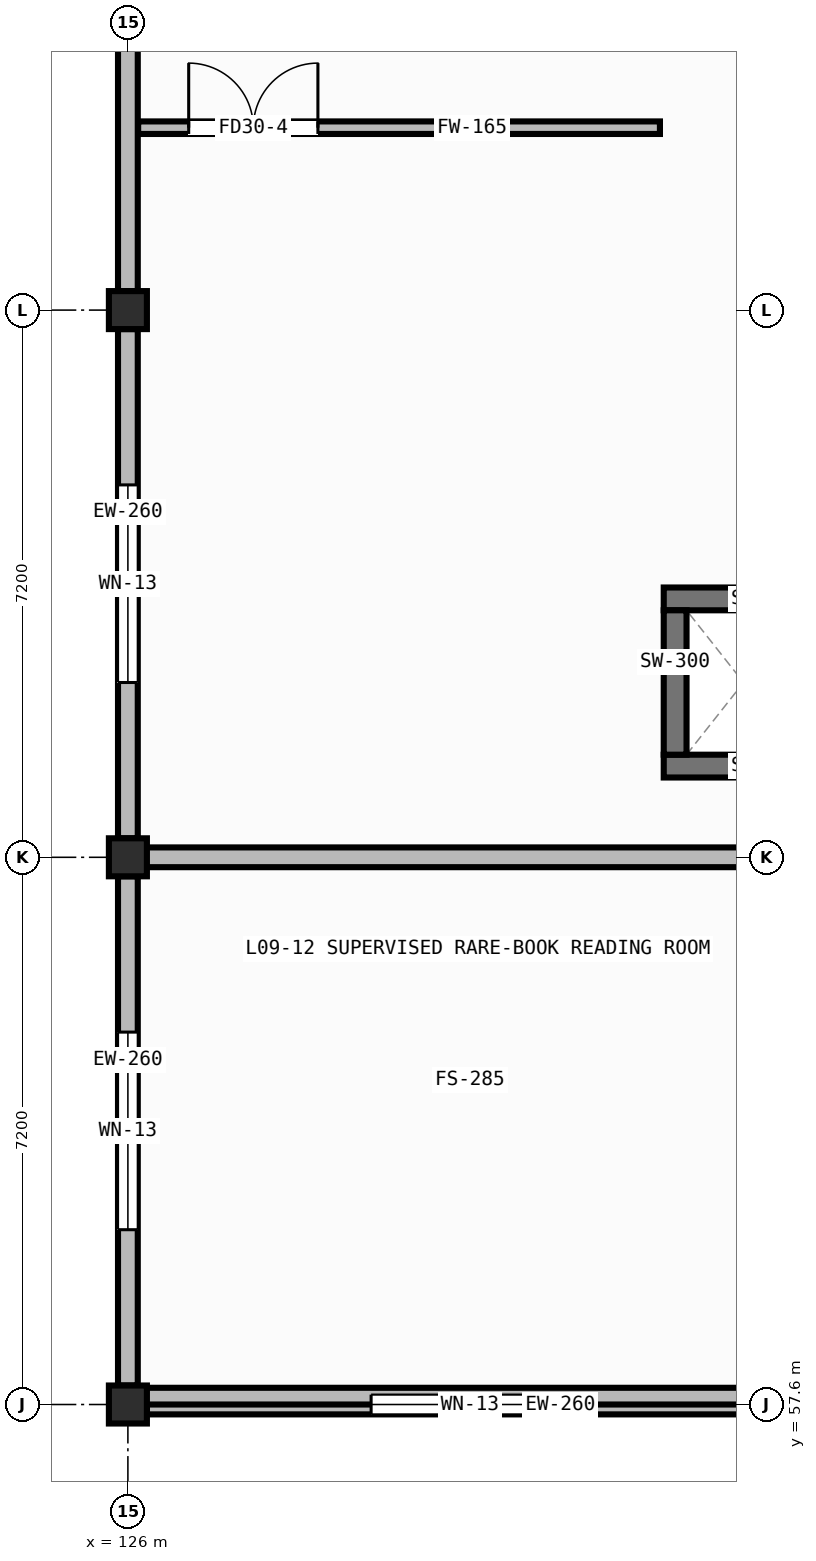
"""IFC4 building model, lengths in metres.
Left out: names, types, materials, properties, quantities, classifications, styles, units other than length and angle.
Written with IfcOpenShell. Run it as: python <this file> out.ifc"""

import sys

from ifc_helpers import new_model, si_unit, direction, frame, frame_2d, origin, origin_2d, place, context, subcontext, project, spatial, rectangle, hollow_rectangle, extrude, element, fill, save


model = new_model("IFC4")
c1 = context("Model", 3, precision=1e-05, world=origin(), true_north=direction((0.0, 1.0)))
c2 = subcontext(c1, "Body", "Model", "MODEL_VIEW")
j1 = project(units=[si_unit("LENGTHUNIT", "METRE"), si_unit("PLANEANGLEUNIT", "RADIAN")], contexts=[c1])
p1 = place(None, origin())
s1 = spatial("IfcSite", under=j1, at=p1, CompositionType="ELEMENT")
p2 = place(p1, origin())
s2 = spatial("IfcBuilding", under=s1, at=p2, CompositionType="ELEMENT")
p3 = place(p2, frame((0.0, 0.0, 31.4)))
s3 = spatial("IfcBuildingStorey", under=s2, at=p3, CompositionType="ELEMENT", Elevation=31.4)
for number, where, z_axis, x_axis in (
    (1, (126.0, 57.6, 0.0), (0.0, 0.0, 1.0), (1.0, 0.0, 0.0)),
    (2, (126.0, 64.8, 0.0), (0.0, 0.0, 1.0), (1.0, 0.0, 0.0)),
    (3, (126.0, 72.0, 0.0), (0.0, 0.0, 1.0), (1.0, 0.0, 0.0)),
):
    element("IfcColumn", number, at=place(p3, frame(where, z_axis=z_axis, x_axis=x_axis)), inside=s3, PredefinedType="COLUMN", context=c2, shape_type="SweptSolid", body=[
        extrude(hollow_rectangle(XDim=0.5, YDim=0.5, WallThickness=0.022, at=origin_2d()), origin(), (0.0, 0.0, 1.0), 3.56),
    ])
p4 = place(p3, frame((126.25, 57.6, 0.0), z_axis=(0.0, 0.0, 1.0), x_axis=(1.0, 0.0, 0.0)))
e4 = element("IfcWall", 4, at=p4, inside=s3, PredefinedType="STANDARD", context=c2, shape_type="SweptSolid", body=[
    extrude(rectangle(XDim=8.5, YDim=0.26, at=frame_2d((4.25, 0.0))), origin(), (0.0, 0.0, 1.0), 3.16),
])
p5 = place(p4, frame((2.95, 0.0, 0.85)))
e5 = element("IfcOpeningElement", 5, at=p5, cuts=e4, PredefinedType="OPENING", context=c2, shape_type="SweptSolid", body=[
    extrude(rectangle(XDim=2.6, YDim=1.6, at=frame_2d((1.3, 0.8))), frame((0.0, 0.142, 0.0), z_axis=(0.0, -1.0, 0.0), x_axis=(1.0, 0.0, 0.0)), (0.0, 0.0, 1.0), 0.284),
])
p6 = place(p3, frame((126.0, 57.85, 0.0), z_axis=(0.0, 0.0, 1.0), x_axis=(0.0, 1.0, 0.0)))
e6 = element("IfcWall", 6, at=p6, inside=s3, PredefinedType="STANDARD", context=c2, shape_type="SweptSolid", body=[
    extrude(rectangle(XDim=6.7, YDim=0.26, at=frame_2d((3.35, 0.0))), origin(), (0.0, 0.0, 1.0), 3.16),
])
p7 = place(p6, frame((2.05, 0.0, 0.85)))
e7 = element("IfcOpeningElement", 7, at=p7, cuts=e6, PredefinedType="OPENING", context=c2, shape_type="SweptSolid", body=[
    extrude(rectangle(XDim=2.6, YDim=1.6, at=frame_2d((1.3, 0.8))), frame((0.0, 0.142, 0.0), z_axis=(0.0, -1.0, 0.0), x_axis=(1.0, 0.0, 0.0)), (0.0, 0.0, 1.0), 0.284),
])
p8 = place(p3, frame((126.0, 65.05, 0.0), z_axis=(0.0, 0.0, 1.0), x_axis=(0.0, 1.0, 0.0)))
e8 = element("IfcWall", 8, at=p8, inside=s3, PredefinedType="STANDARD", context=c2, shape_type="SweptSolid", body=[
    extrude(rectangle(XDim=6.7, YDim=0.26, at=frame_2d((3.35, 0.0))), origin(), (0.0, 0.0, 1.0), 3.16),
])
p9 = place(p8, frame((2.05, 0.0, 0.85)))
e9 = element("IfcOpeningElement", 9, at=p9, cuts=e8, PredefinedType="OPENING", context=c2, shape_type="SweptSolid", body=[
    extrude(rectangle(XDim=2.6, YDim=1.6, at=frame_2d((1.3, 0.8))), frame((0.0, 0.142, 0.0), z_axis=(0.0, -1.0, 0.0), x_axis=(1.0, 0.0, 0.0)), (0.0, 0.0, 1.0), 0.284),
])
p10 = place(p3, frame((126.0, 72.25, 0.0), z_axis=(0.0, 0.0, 1.0), x_axis=(0.0, 1.0, 0.0)))
e10 = element("IfcWall", 10, at=p10, inside=s3, PredefinedType="STANDARD", context=c2, shape_type="SweptSolid", body=[
    extrude(rectangle(XDim=6.7, YDim=0.26, at=frame_2d((3.35, 0.0))), origin(), (0.0, 0.0, 1.0), 3.16),
])
p11 = place(p3, frame((126.2, 64.8, 3.8), z_axis=(0.0, 0.0, 1.0), x_axis=(1.0, 0.0, 0.0)))
e11 = element("IfcWall", 11, at=p11, inside=s3, PredefinedType="STANDARD", context=c2, shape_type="SweptSolid", body=[
    extrude(rectangle(XDim=35.6, YDim=0.26, at=frame_2d((17.8, 0.0))), origin(), (0.0, 0.0, 1.0), 1.92),
])
p12 = place(p3, frame((126.0, 57.71, 3.8), z_axis=(0.0, 0.0, 1.0), x_axis=(1.0, 0.0, 0.0)))
e12 = element("IfcWall", 12, at=p12, inside=s3, PredefinedType="PARAPET", context=c2, shape_type="SweptSolid", body=[
    extrude(rectangle(XDim=36.0, YDim=0.22, at=frame_2d((18.0, 0.0))), origin(), (0.0, 0.0, 1.0), 0.9),
])
for number, where, z_axis, x_axis in (
    (13, (133.05, 66.0, 0.0), (0.0, 0.0, 1.0), (1.0, 0.0, 0.0)),
    (14, (133.05, 68.2, 0.0), (0.0, 0.0, 1.0), (1.0, 0.0, 0.0)),
):
    element("IfcWall", number, at=place(p3, frame(where, z_axis=z_axis, x_axis=x_axis)), inside=s3, PredefinedType="SHEAR", context=c2, shape_type="SweptSolid", body=[
        extrude(rectangle(XDim=2.1, YDim=0.3, at=frame_2d((1.05, 0.0))), origin(), (0.0, 0.0, 1.0), 3.56),
    ])
p13 = place(p3, frame((133.2, 66.15, 0.0), z_axis=(0.0, 0.0, 1.0), x_axis=(0.0, 1.0, 0.0)))
e15 = element("IfcWall", 15, at=p13, inside=s3, PredefinedType="SHEAR", context=c2, shape_type="SweptSolid", body=[
    extrude(rectangle(XDim=1.9, YDim=0.3, at=frame_2d((0.95, 0.0))), origin(), (0.0, 0.0, 1.0), 3.56),
])
p14 = place(p3, frame((126.135, 74.4, 0.0), z_axis=(0.0, 0.0, 1.0), x_axis=(1.0, 0.0, 0.0)))
e16 = element("IfcWall", 16, at=p14, inside=s3, PredefinedType="PARTITIONING", context=c2, shape_type="SweptSolid", body=[
    extrude(rectangle(XDim=6.865, YDim=0.165, at=frame_2d((3.433, 0.0))), origin(), (0.0, 0.0, 1.0), 3.56),
])
p15 = place(p14, frame((0.665, 0.0, 0.0)))
e17 = element("IfcOpeningElement", 17, at=p15, cuts=e16, PredefinedType="OPENING", context=c2, shape_type="SweptSolid", body=[
    extrude(rectangle(XDim=1.7, YDim=2.12, at=frame_2d((0.85, 1.06))), frame((0.0, 0.094, 0.0), z_axis=(0.0, -1.0, 0.0), x_axis=(1.0, 0.0, 0.0)), (0.0, 0.0, 1.0), 0.189),
])
p16 = place(p5, origin())
e18 = element("IfcWindow", 18, at=p16, inside=s3, PartitioningType="DOUBLE_PANEL_VERTICAL", PredefinedType="WINDOW", context=c2, shape_type="SweptSolid", body=[
    extrude(rectangle(XDim=2.6, YDim=1.6, at=frame_2d((1.3, 0.8))), frame((0.0, 0.03, 0.0), z_axis=(0.0, -1.0, 0.0), x_axis=(1.0, 0.0, 0.0)), (0.0, 0.0, 1.0), 0.06),
])
fill(e5, e18)
p17 = place(p7, origin())
e19 = element("IfcWindow", 19, at=p17, inside=s3, PartitioningType="DOUBLE_PANEL_VERTICAL", PredefinedType="WINDOW", context=c2, shape_type="SweptSolid", body=[
    extrude(rectangle(XDim=2.6, YDim=1.6, at=frame_2d((1.3, 0.8))), frame((0.0, 0.03, 0.0), z_axis=(0.0, -1.0, 0.0), x_axis=(1.0, 0.0, 0.0)), (0.0, 0.0, 1.0), 0.06),
])
fill(e7, e19)
p18 = place(p9, origin())
e20 = element("IfcWindow", 20, at=p18, inside=s3, PartitioningType="DOUBLE_PANEL_VERTICAL", PredefinedType="WINDOW", context=c2, shape_type="SweptSolid", body=[
    extrude(rectangle(XDim=2.6, YDim=1.6, at=frame_2d((1.3, 0.8))), frame((0.0, 0.03, 0.0), z_axis=(0.0, -1.0, 0.0), x_axis=(1.0, 0.0, 0.0)), (0.0, 0.0, 1.0), 0.06),
])
fill(e9, e20)
p19 = place(p15, origin())
e21 = element("IfcDoor", 21, at=p19, inside=s3, OperationType="DOUBLE_DOOR_SINGLE_SWING", PredefinedType="DOOR", context=c2, shape_type="SweptSolid", body=[
    extrude(rectangle(XDim=1.7, YDim=2.12, at=frame_2d((0.85, 1.06))), frame((0.0, 0.025, 0.0), z_axis=(0.0, -1.0, 0.0), x_axis=(1.0, 0.0, 0.0)), (0.0, 0.0, 1.0), 0.05),
])
fill(e17, e21)
save(model, sys.argv[1])
